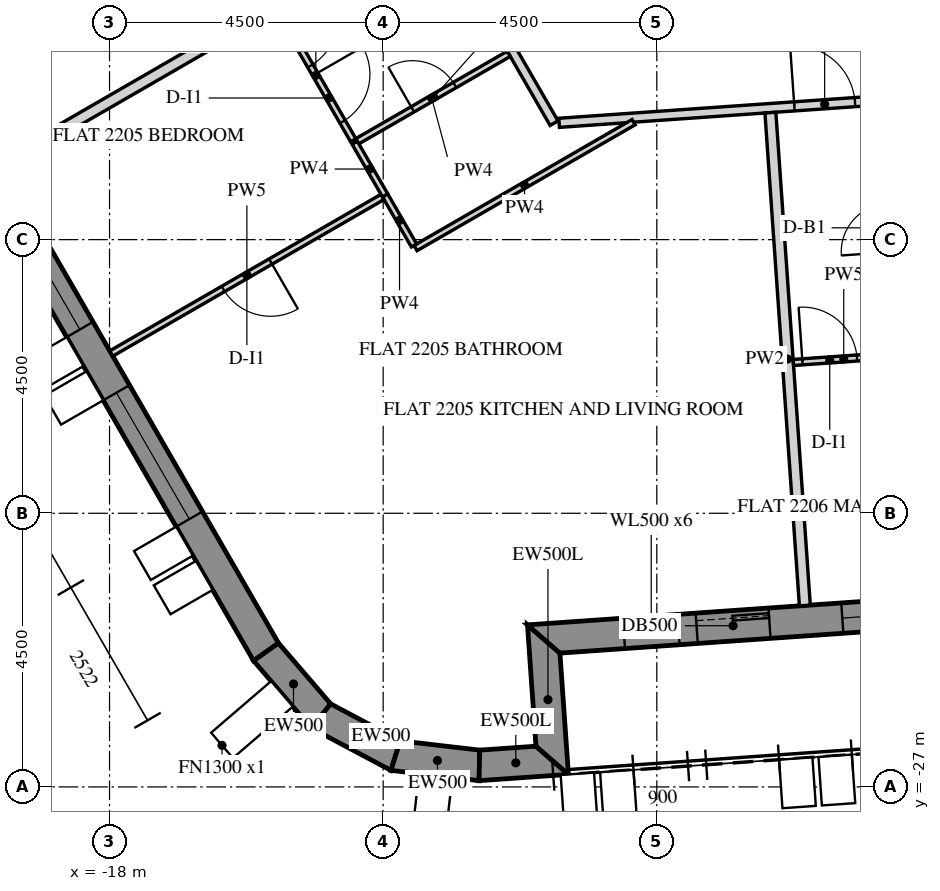
"""IFC4 building model, lengths in metres.
Left out: names, types, materials, properties, quantities, classifications, styles, units other than length and angle.
Written with IfcOpenShell. Run it as: python <this file> out.ifc"""

import sys

from ifc_helpers import new_model, si_unit, direction, frame, frame_2d, origin, place, context, subcontext, project, spatial, polyline, rectangle, outline, extrude, element, fill, save


model = new_model("IFC4")
c1 = context("Model", 3, precision=1e-05, world=origin(), true_north=direction((0.0, 1.0)))
c2 = subcontext(c1, "Body", "Model", "MODEL_VIEW")
j1 = project(units=[si_unit("LENGTHUNIT", "METRE"), si_unit("PLANEANGLEUNIT", "RADIAN")], contexts=[c1])
p1 = place(None, origin())
s1 = spatial("IfcSite", under=j1, at=p1, CompositionType="ELEMENT")
p2 = place(p1, origin())
s2 = spatial("IfcBuilding", under=s1, at=p2, CompositionType="ELEMENT")
p3 = place(p2, frame((0.0, 0.0, 279.6)))
s3 = spatial("IfcBuildingStorey", under=s2, at=p3, CompositionType="ELEMENT", Elevation=279.6)
p4 = place(p3, frame((-28.149, -2.745, -0.15), z_axis=(0.0, 0.0, 1.0), x_axis=(0.500003737743, -0.866023245787, 0.0)))
e1 = element("IfcWall", 1, at=p4, inside=s3, PredefinedType="SOLIDWALL", context=c2, shape_type="SweptSolid", body=[
    extrude(outline(polyline([(-0.021, -0.25), (25.468, -0.25), (25.421, 0.25), (0.021, 0.25), (-0.021, -0.25)])), origin(), (0.0, 0.0, 1.0), 3.9),
])
p5 = place(p4, frame((2.522, 0.0, 0.75)))
e2 = element("IfcOpeningElement", 2, at=p5, cuts=e1, PredefinedType="OPENING", context=c2, shape_type="SweptSolid", body=[
    extrude(rectangle(XDim=2.4, YDim=2.7, at=frame_2d((1.2, 1.35))), frame((0.0, 0.26, 0.0), z_axis=(0.0, -1.0, 0.0), x_axis=(1.0, 0.0, 0.0)), (0.0, 0.0, 1.0), 0.52),
])
p6 = place(p4, frame((6.122, 0.0, 0.75)))
e3 = element("IfcOpeningElement", 3, at=p6, cuts=e1, PredefinedType="OPENING", context=c2, shape_type="SweptSolid", body=[
    extrude(rectangle(XDim=2.4, YDim=2.7, at=frame_2d((1.2, 1.35))), frame((0.0, 0.26, 0.0), z_axis=(0.0, -1.0, 0.0), x_axis=(1.0, 0.0, 0.0)), (0.0, 0.0, 1.0), 0.52),
])
p7 = place(p4, frame((9.722, 0.0, 0.75)))
e4 = element("IfcOpeningElement", 4, at=p7, cuts=e1, PredefinedType="OPENING", context=c2, shape_type="SweptSolid", body=[
    extrude(rectangle(XDim=2.4, YDim=2.7, at=frame_2d((1.2, 1.35))), frame((0.0, 0.26, 0.0), z_axis=(0.0, -1.0, 0.0), x_axis=(1.0, 0.0, 0.0)), (0.0, 0.0, 1.0), 0.52),
])
p8 = place(p4, frame((13.323, 0.0, 0.75)))
e5 = element("IfcOpeningElement", 5, at=p8, cuts=e1, PredefinedType="OPENING", context=c2, shape_type="SweptSolid", body=[
    extrude(rectangle(XDim=2.4, YDim=2.7, at=frame_2d((1.2, 1.35))), frame((0.0, 0.26, 0.0), z_axis=(0.0, -1.0, 0.0), x_axis=(1.0, 0.0, 0.0)), (0.0, 0.0, 1.0), 0.52),
])
p9 = place(p4, frame((16.922, 0.0, 0.75)))
e6 = element("IfcOpeningElement", 6, at=p9, cuts=e1, PredefinedType="OPENING", context=c2, shape_type="SweptSolid", body=[
    extrude(rectangle(XDim=2.4, YDim=2.7, at=frame_2d((1.2, 1.35))), frame((0.0, 0.26, 0.0), z_axis=(0.0, -1.0, 0.0), x_axis=(1.0, 0.0, 0.0)), (0.0, 0.0, 1.0), 0.52),
])
p10 = place(p4, frame((20.522, 0.0, 0.75)))
e7 = element("IfcOpeningElement", 7, at=p10, cuts=e1, PredefinedType="OPENING", context=c2, shape_type="SweptSolid", body=[
    extrude(rectangle(XDim=2.4, YDim=2.7, at=frame_2d((1.2, 1.35))), frame((0.0, 0.26, 0.0), z_axis=(0.0, -1.0, 0.0), x_axis=(1.0, 0.0, 0.0)), (0.0, 0.0, 1.0), 0.52),
])
p11 = place(p3, frame((-15.427, -24.78, -0.15), z_axis=(0.0, 0.0, 1.0), x_axis=(0.651616566281, -0.758548515619, 0.0)))
e8 = element("IfcWall", 8, at=p11, inside=s3, PredefinedType="SOLIDWALL", context=c2, shape_type="SweptSolid", body=[
    extrude(outline(polyline([(-0.023, -0.25), (1.435, -0.25), (1.341, 0.25), (0.023, 0.25), (-0.023, -0.25)])), origin(), (0.0, 0.0, 1.0), 3.9),
])
p12 = place(p3, frame((-14.522, -25.833, -0.15), z_axis=(0.0, 0.0, 1.0), x_axis=(0.882926676147, -0.469510899286, 0.0)))
e9 = element("IfcWall", 9, at=p12, inside=s3, PredefinedType="SOLIDWALL", context=c2, shape_type="SweptSolid", body=[
    extrude(outline(polyline([(-0.047, -0.25), (1.436, -0.25), (1.341, 0.25), (0.047, 0.25), (-0.047, -0.25)])), origin(), (0.0, 0.0, 1.0), 3.9),
])
p13 = place(p3, frame((-13.296, -26.485, -0.15), z_axis=(0.0, 0.0, 1.0), x_axis=(0.993239161627, -0.116086036245, 0.0)))
e10 = element("IfcWall", 10, at=p13, inside=s3, PredefinedType="SOLIDWALL", context=c2, shape_type="SweptSolid", body=[
    extrude(outline(polyline([(-0.047, -0.25), (1.411, -0.25), (1.365, 0.25), (0.047, 0.25), (-0.047, -0.25)])), origin(), (0.0, 0.0, 1.0), 3.9),
])
p14 = place(p3, frame((-11.917, -26.646, -0.15), z_axis=(0.0, 0.0, 1.0), x_axis=(0.997562933087, 0.069772448216, 0.0)))
e11 = element("IfcWall", 11, at=p14, inside=s3, PredefinedType="SOLIDWALL", context=c2, shape_type="SweptSolid", body=[
    extrude(outline(polyline([(-0.023, -0.25), (1.45, -0.25), (0.95, 0.25), (0.023, 0.25), (-0.023, -0.25)])), origin(), (0.0, 0.0, 1.0), 3.9),
])
p15 = place(p3, frame((-10.72, -26.562, -0.15), z_axis=(0.0, 0.0, 1.0), x_axis=(-0.069824268692, 0.99755930726, 0.0)))
e12 = element("IfcWall", 12, at=p15, inside=s3, PredefinedType="SOLIDWALL", context=c2, shape_type="SweptSolid", body=[
    extrude(outline(polyline([(-0.25, -0.25), (1.75, -0.25), (2.25, 0.25), (0.25, 0.25), (-0.25, -0.25)])), origin(), (0.0, 0.0, 1.0), 3.9),
])
p16 = place(p3, frame((-10.86, -24.567, -0.15), z_axis=(0.0, 0.0, 1.0), x_axis=(0.997564329317, 0.06975248292, 0.0)))
e13 = element("IfcWall", 13, at=p16, inside=s3, PredefinedType="SOLIDWALL", context=c2, shape_type="SweptSolid", body=[
    extrude(outline(polyline([(0.25, -0.25), (22.795, -0.25), (23.295, 0.25), (-0.25, 0.25), (0.25, -0.25)])), origin(), (0.0, 0.0, 1.0), 3.9),
])
p17 = place(p16, frame((1.323, 0.0, 1.05)))
e14 = element("IfcOpeningElement", 14, at=p17, cuts=e13, PredefinedType="OPENING", context=c2, shape_type="SweptSolid", body=[
    extrude(rectangle(XDim=0.9, YDim=1.5, at=frame_2d((0.45, 0.75))), frame((0.0, 0.26, 0.0), z_axis=(0.0, -1.0, 0.0), x_axis=(1.0, 0.0, 0.0)), (0.0, 0.0, 1.0), 0.52),
])
p18 = place(p16, frame((2.522, 0.0, 0.15)))
e15 = element("IfcOpeningElement", 15, at=p18, cuts=e13, PredefinedType="OPENING", context=c2, shape_type="SweptSolid", body=[
    extrude(rectangle(XDim=1.2, YDim=2.4, at=frame_2d((0.6, 1.2))), frame((0.0, 0.26, 0.0), z_axis=(0.0, -1.0, 0.0), x_axis=(1.0, 0.0, 0.0)), (0.0, 0.0, 1.0), 0.52),
])
p19 = place(p16, frame((4.922, 0.0, 1.05)))
e16 = element("IfcOpeningElement", 16, at=p19, cuts=e13, PredefinedType="OPENING", context=c2, shape_type="SweptSolid", body=[
    extrude(rectangle(XDim=0.9, YDim=1.5, at=frame_2d((0.45, 0.75))), frame((0.0, 0.26, 0.0), z_axis=(0.0, -1.0, 0.0), x_axis=(1.0, 0.0, 0.0)), (0.0, 0.0, 1.0), 0.52),
])
p20 = place(p16, frame((6.122, 0.0, 0.15)))
e17 = element("IfcOpeningElement", 17, at=p20, cuts=e13, PredefinedType="OPENING", context=c2, shape_type="SweptSolid", body=[
    extrude(rectangle(XDim=1.2, YDim=2.4, at=frame_2d((0.6, 1.2))), frame((0.0, 0.26, 0.0), z_axis=(0.0, -1.0, 0.0), x_axis=(1.0, 0.0, 0.0)), (0.0, 0.0, 1.0), 0.52),
])
p21 = place(p16, frame((8.522, 0.0, 1.05)))
e18 = element("IfcOpeningElement", 18, at=p21, cuts=e13, PredefinedType="OPENING", context=c2, shape_type="SweptSolid", body=[
    extrude(rectangle(XDim=0.9, YDim=1.5, at=frame_2d((0.45, 0.75))), frame((0.0, 0.26, 0.0), z_axis=(0.0, -1.0, 0.0), x_axis=(1.0, 0.0, 0.0)), (0.0, 0.0, 1.0), 0.52),
])
p22 = place(p16, frame((9.722, 0.0, 0.15)))
e19 = element("IfcOpeningElement", 19, at=p22, cuts=e13, PredefinedType="OPENING", context=c2, shape_type="SweptSolid", body=[
    extrude(rectangle(XDim=1.2, YDim=2.4, at=frame_2d((0.6, 1.2))), frame((0.0, 0.26, 0.0), z_axis=(0.0, -1.0, 0.0), x_axis=(1.0, 0.0, 0.0)), (0.0, 0.0, 1.0), 0.52),
])
p23 = place(p16, frame((12.122, 0.0, 1.05)))
e20 = element("IfcOpeningElement", 20, at=p23, cuts=e13, PredefinedType="OPENING", context=c2, shape_type="SweptSolid", body=[
    extrude(rectangle(XDim=0.9, YDim=1.5, at=frame_2d((0.45, 0.75))), frame((0.0, 0.26, 0.0), z_axis=(0.0, -1.0, 0.0), x_axis=(1.0, 0.0, 0.0)), (0.0, 0.0, 1.0), 0.52),
])
p24 = place(p16, frame((13.323, 0.0, 0.15)))
e21 = element("IfcOpeningElement", 21, at=p24, cuts=e13, PredefinedType="OPENING", context=c2, shape_type="SweptSolid", body=[
    extrude(rectangle(XDim=1.2, YDim=2.4, at=frame_2d((0.6, 1.2))), frame((0.0, 0.26, 0.0), z_axis=(0.0, -1.0, 0.0), x_axis=(1.0, 0.0, 0.0)), (0.0, 0.0, 1.0), 0.52),
])
p25 = place(p16, frame((15.722, 0.0, 1.05)))
e22 = element("IfcOpeningElement", 22, at=p25, cuts=e13, PredefinedType="OPENING", context=c2, shape_type="SweptSolid", body=[
    extrude(rectangle(XDim=0.9, YDim=1.5, at=frame_2d((0.45, 0.75))), frame((0.0, 0.26, 0.0), z_axis=(0.0, -1.0, 0.0), x_axis=(1.0, 0.0, 0.0)), (0.0, 0.0, 1.0), 0.52),
])
p26 = place(p16, frame((16.922, 0.0, 0.15)))
e23 = element("IfcOpeningElement", 23, at=p26, cuts=e13, PredefinedType="OPENING", context=c2, shape_type="SweptSolid", body=[
    extrude(rectangle(XDim=1.2, YDim=2.4, at=frame_2d((0.6, 1.2))), frame((0.0, 0.26, 0.0), z_axis=(0.0, -1.0, 0.0), x_axis=(1.0, 0.0, 0.0)), (0.0, 0.0, 1.0), 0.52),
])
p27 = place(p16, frame((19.323, 0.0, 1.05)))
e24 = element("IfcOpeningElement", 24, at=p27, cuts=e13, PredefinedType="OPENING", context=c2, shape_type="SweptSolid", body=[
    extrude(rectangle(XDim=0.9, YDim=1.5, at=frame_2d((0.45, 0.75))), frame((0.0, 0.26, 0.0), z_axis=(0.0, -1.0, 0.0), x_axis=(1.0, 0.0, 0.0)), (0.0, 0.0, 1.0), 0.52),
])
p28 = place(p16, frame((20.522, 0.0, 0.15)))
e25 = element("IfcOpeningElement", 25, at=p28, cuts=e13, PredefinedType="OPENING", context=c2, shape_type="SweptSolid", body=[
    extrude(rectangle(XDim=1.2, YDim=2.4, at=frame_2d((0.6, 1.2))), frame((0.0, 0.26, 0.0), z_axis=(0.0, -1.0, 0.0), x_axis=(1.0, 0.0, 0.0)), (0.0, 0.0, 1.0), 0.52),
])
p29 = place(p3, frame((-18.338, -2.838, 0.0), z_axis=(0.0, 0.0, 1.0), x_axis=(0.499999693481, -0.866025580753, 0.0)))
e26 = element("IfcWall", 26, at=p29, inside=s3, PredefinedType="PARTITIONING", context=c2, shape_type="SweptSolid", body=[
    extrude(rectangle(XDim=15.296, YDim=0.15, at=frame_2d((7.648, 0.0))), origin(), (0.0, 0.0, 1.0), 2.988),
])
p30 = place(p29, frame((2.325, 0.0, 0.0)))
e27 = element("IfcOpeningElement", 27, at=p30, cuts=e26, PredefinedType="OPENING", context=c2, shape_type="SweptSolid", body=[
    extrude(rectangle(XDim=1.0, YDim=2.1, at=frame_2d((0.5, 1.05))), frame((0.0, 0.085, 0.0), z_axis=(0.0, -1.0, 0.0), x_axis=(1.0, 0.0, 0.0)), (0.0, 0.0, 1.0), 0.17),
])
p31 = place(p29, frame((12.136, 0.0, 0.0)))
e28 = element("IfcOpeningElement", 28, at=p31, cuts=e26, PredefinedType="OPENING", context=c2, shape_type="SweptSolid", body=[
    extrude(rectangle(XDim=1.0, YDim=2.1, at=frame_2d((0.5, 1.05))), frame((0.0, 0.085, 0.0), z_axis=(0.0, -1.0, 0.0), x_axis=(1.0, 0.0, 0.0)), (0.0, 0.0, 1.0), 0.17),
])
p32 = place(p3, frame((-10.606, -16.079, 0.0), z_axis=(0.0, 0.0, 1.0), x_axis=(0.997563356349, 0.069766396426, 0.0)))
e29 = element("IfcWall", 29, at=p32, inside=s3, PredefinedType="PARTITIONING", context=c2, shape_type="SweptSolid", body=[
    extrude(rectangle(XDim=17.273, YDim=0.15, at=frame_2d((8.636, 0.0))), origin(), (0.0, 0.0, 1.0), 2.988),
])
p33 = place(p32, frame((3.877, 0.0, 0.0)))
e30 = element("IfcOpeningElement", 30, at=p33, cuts=e29, PredefinedType="OPENING", context=c2, shape_type="SweptSolid", body=[
    extrude(rectangle(XDim=1.0, YDim=2.1, at=frame_2d((0.5, 1.05))), frame((0.0, 0.085, 0.0), z_axis=(0.0, -1.0, 0.0), x_axis=(1.0, 0.0, 0.0)), (0.0, 0.0, 1.0), 0.17),
])
p34 = place(p3, frame((-19.771, -16.755, 0.0), z_axis=(0.0, 0.0, 1.0), x_axis=(0.866022959057, 0.500004234368, 0.0)))
e31 = element("IfcWall", 31, at=p34, inside=s3, PredefinedType="PARTITIONING", context=c2, shape_type="SweptSolid", body=[
    extrude(rectangle(XDim=8.125, YDim=0.18, at=frame_2d((4.062, 0.0))), origin(), (0.0, 0.0, 1.0), 2.988),
])
p35 = place(p3, frame((-9.382, -16.069, 0.0), z_axis=(0.0, 0.0, 1.0), x_axis=(-0.866028486751, -0.499994660107, 0.0)))
e32 = element("IfcWall", 32, at=p35, inside=s3, PredefinedType="PARTITIONING", context=c2, shape_type="SweptSolid", body=[
    extrude(rectangle(XDim=4.141, YDim=0.1, at=frame_2d((2.07, 0.0))), origin(), (0.0, 0.0, 1.0), 2.988),
])
p36 = place(p3, frame((-12.993, -18.096, 0.0), z_axis=(0.0, 0.0, 1.0), x_axis=(-0.500055416838, 0.865993406494, 0.0)))
e33 = element("IfcWall", 33, at=p36, inside=s3, PredefinedType="PARTITIONING", context=c2, shape_type="SweptSolid", body=[
    extrude(rectangle(XDim=0.952, YDim=0.1, at=frame_2d((0.476, 0.0))), origin(), (0.0, 0.0, 1.0), 2.988),
])
p37 = place(p3, frame((-13.511, -17.298, 0.0), z_axis=(0.0, 0.0, 1.0), x_axis=(-0.866026116456, -0.499998765615, 0.0)))
e34 = element("IfcWall", 34, at=p37, inside=s3, PredefinedType="PARTITIONING", context=c2, shape_type="SweptSolid", body=[
    extrude(rectangle(XDim=5.15, YDim=0.1, at=frame_2d((2.575, 0.0))), origin(), (0.0, 0.0, 1.0), 2.988),
])
p38 = place(p37, frame((2.125, 0.0, 0.0)))
e35 = element("IfcOpeningElement", 35, at=p38, cuts=e34, PredefinedType="OPENING", context=c2, shape_type="SweptSolid", body=[
    extrude(rectangle(XDim=0.9, YDim=2.1, at=frame_2d((0.45, 1.05))), frame((0.0, 0.06, 0.0), z_axis=(0.0, -1.0, 0.0), x_axis=(1.0, 0.0, 0.0)), (0.0, 0.0, 1.0), 0.12),
])
p39 = place(p3, frame((-6.565, -24.017, 0.0), z_axis=(0.0, 0.0, 1.0), x_axis=(-0.069741515951, 0.997565096098, 0.0)))
e36 = element("IfcWall", 36, at=p39, inside=s3, PredefinedType="PARTITIONING", context=c2, shape_type="SweptSolid", body=[
    extrude(rectangle(XDim=8.125, YDim=0.18, at=frame_2d((4.062, 0.0))), origin(), (0.0, 0.0, 1.0), 2.988),
])
p40 = place(p3, frame((-13.968, -16.407, 0.0), z_axis=(0.0, 0.0, 1.0), x_axis=(0.866046596414, 0.499963291492, 0.0)))
e37 = element("IfcWall", 37, at=p40, inside=s3, PredefinedType="PARTITIONING", context=c2, shape_type="SweptSolid", body=[
    extrude(rectangle(XDim=2.925, YDim=0.1, at=frame_2d((1.462, 0.0))), origin(), (0.0, 0.0, 1.0), 2.988),
])
p41 = place(p40, frame((1.1, 0.0, 0.0)))
e38 = element("IfcOpeningElement", 38, at=p41, cuts=e37, PredefinedType="OPENING", context=c2, shape_type="SweptSolid", body=[
    extrude(rectangle(XDim=0.8, YDim=2.1, at=frame_2d((0.4, 1.05))), frame((0.0, 0.06, 0.0), z_axis=(0.0, -1.0, 0.0), x_axis=(1.0, 0.0, 0.0)), (0.0, 0.0, 1.0), 0.12),
])
p42 = place(p3, frame((-15.223, -14.233, 0.0), z_axis=(0.0, 0.0, 1.0), x_axis=(0.500000007376, -0.866025399526, 0.0)))
e39 = element("IfcWall", 39, at=p42, inside=s3, PredefinedType="PARTITIONING", context=c2, shape_type="SweptSolid", body=[
    extrude(rectangle(XDim=2.462, YDim=0.1, at=frame_2d((1.231, 0.0))), origin(), (0.0, 0.0, 1.0), 2.988),
])
p43 = place(p42, frame((0.15, 0.0, 0.0)))
e40 = element("IfcOpeningElement", 40, at=p43, cuts=e39, PredefinedType="OPENING", context=c2, shape_type="SweptSolid", body=[
    extrude(rectangle(XDim=0.9, YDim=2.1, at=frame_2d((0.45, 1.05))), frame((0.0, 0.06, 0.0), z_axis=(0.0, -1.0, 0.0), x_axis=(1.0, 0.0, 0.0)), (0.0, 0.0, 1.0), 0.12),
])
p44 = place(p42, frame((1.21, 0.0, 0.0)))
e41 = element("IfcOpeningElement", 41, at=p44, cuts=e39, PredefinedType="OPENING", context=c2, shape_type="SweptSolid", body=[
    extrude(rectangle(XDim=0.9, YDim=2.1, at=frame_2d((0.45, 1.05))), frame((0.0, 0.06, 0.0), z_axis=(0.0, -1.0, 0.0), x_axis=(1.0, 0.0, 0.0)), (0.0, 0.0, 1.0), 0.12),
])
p45 = place(p3, frame((-13.969, -16.405, 0.0), z_axis=(0.0, 0.0, 1.0), x_axis=(0.499912255713, -0.866076057046, 0.0)))
e42 = element("IfcWall", 42, at=p45, inside=s3, PredefinedType="PARTITIONING", context=c2, shape_type="SweptSolid", body=[
    extrude(rectangle(XDim=1.002, YDim=0.1, at=frame_2d((0.501, 0.0))), origin(), (0.0, 0.0, 1.0), 2.988),
])
p46 = place(p3, frame((-6.755, -20.02, 0.0), z_axis=(0.0, 0.0, 1.0), x_axis=(0.9975627517, 0.069775041534, 0.0)))
e43 = element("IfcWall", 43, at=p46, inside=s3, PredefinedType="PARTITIONING", context=c2, shape_type="SweptSolid", body=[
    extrude(rectangle(XDim=1.662, YDim=0.1, at=frame_2d((0.831, 0.0))), origin(), (0.0, 0.0, 1.0), 2.988),
])
p47 = place(p46, frame((0.15, 0.0, 0.0)))
e44 = element("IfcOpeningElement", 44, at=p47, cuts=e43, PredefinedType="OPENING", context=c2, shape_type="SweptSolid", body=[
    extrude(rectangle(XDim=0.9, YDim=2.1, at=frame_2d((0.45, 1.05))), frame((0.0, 0.06, 0.0), z_axis=(0.0, -1.0, 0.0), x_axis=(1.0, 0.0, 0.0)), (0.0, 0.0, 1.0), 0.12),
])
p48 = place(p9, frame((0.0, 0.18, 0.0)))
e45 = element("IfcWindow", 45, at=p48, inside=s3, PartitioningType="DOUBLE_PANEL_VERTICAL", PredefinedType="WINDOW", context=c2, shape_type="SweptSolid", body=[
    extrude(rectangle(XDim=2.4, YDim=2.7, at=frame_2d((1.2, 1.35))), frame((0.0, 0.03, 0.0), z_axis=(0.0, -1.0, 0.0), x_axis=(1.0, 0.0, 0.0)), (0.0, 0.0, 1.0), 0.06),
])
fill(e6, e45)
p49 = place(p10, frame((0.0, 0.18, 0.0)))
e46 = element("IfcWindow", 46, at=p49, inside=s3, PartitioningType="DOUBLE_PANEL_VERTICAL", PredefinedType="WINDOW", context=c2, shape_type="SweptSolid", body=[
    extrude(rectangle(XDim=2.4, YDim=2.7, at=frame_2d((1.2, 1.35))), frame((0.0, 0.03, 0.0), z_axis=(0.0, -1.0, 0.0), x_axis=(1.0, 0.0, 0.0)), (0.0, 0.0, 1.0), 0.06),
])
fill(e7, e46)
p50 = place(p17, frame((0.0, 0.18, 0.0)))
e47 = element("IfcWindow", 47, at=p50, inside=s3, PartitioningType="SINGLE_PANEL", PredefinedType="WINDOW", context=c2, shape_type="SweptSolid", body=[
    extrude(rectangle(XDim=0.9, YDim=1.5, at=frame_2d((0.45, 0.75))), frame((0.0, 0.03, 0.0), z_axis=(0.0, -1.0, 0.0), x_axis=(1.0, 0.0, 0.0)), (0.0, 0.0, 1.0), 0.06),
])
fill(e14, e47)
p51 = place(p18, frame((0.0, 0.175, 0.0)))
e48 = element("IfcDoor", 48, at=p51, inside=s3, OperationType="SLIDING_TO_LEFT", PredefinedType="DOOR", context=c2, shape_type="SweptSolid", body=[
    extrude(rectangle(XDim=1.2, YDim=2.4, at=frame_2d((0.6, 1.2))), frame((0.0, 0.025, 0.0), z_axis=(0.0, -1.0, 0.0), x_axis=(1.0, 0.0, 0.0)), (0.0, 0.0, 1.0), 0.05),
])
fill(e15, e48)
p52 = place(p19, frame((0.0, 0.18, 0.0)))
e49 = element("IfcWindow", 49, at=p52, inside=s3, PartitioningType="SINGLE_PANEL", PredefinedType="WINDOW", context=c2, shape_type="SweptSolid", body=[
    extrude(rectangle(XDim=0.9, YDim=1.5, at=frame_2d((0.45, 0.75))), frame((0.0, 0.03, 0.0), z_axis=(0.0, -1.0, 0.0), x_axis=(1.0, 0.0, 0.0)), (0.0, 0.0, 1.0), 0.06),
])
fill(e16, e49)
p53 = place(p41, origin())
e50 = element("IfcDoor", 50, at=p53, inside=s3, OperationType="SINGLE_SWING_LEFT", PredefinedType="DOOR", context=c2, shape_type="SweptSolid", body=[
    extrude(rectangle(XDim=0.8, YDim=2.1, at=frame_2d((0.4, 1.05))), frame((0.0, 0.025, 0.0), z_axis=(0.0, -1.0, 0.0), x_axis=(1.0, 0.0, 0.0)), (0.0, 0.0, 1.0), 0.05),
])
fill(e38, e50)
p54 = place(p43, origin())
e51 = element("IfcDoor", 51, at=p54, inside=s3, OperationType="SINGLE_SWING_LEFT", PredefinedType="DOOR", context=c2, shape_type="SweptSolid", body=[
    extrude(rectangle(XDim=0.9, YDim=2.1, at=frame_2d((0.45, 1.05))), frame((0.0, 0.025, 0.0), z_axis=(0.0, -1.0, 0.0), x_axis=(1.0, 0.0, 0.0)), (0.0, 0.0, 1.0), 0.05),
])
fill(e40, e51)
p55 = place(p44, origin())
e52 = element("IfcDoor", 52, at=p55, inside=s3, OperationType="SINGLE_SWING_LEFT", PredefinedType="DOOR", context=c2, shape_type="SweptSolid", body=[
    extrude(rectangle(XDim=0.9, YDim=2.1, at=frame_2d((0.45, 1.05))), frame((0.0, 0.025, 0.0), z_axis=(0.0, -1.0, 0.0), x_axis=(1.0, 0.0, 0.0)), (0.0, 0.0, 1.0), 0.05),
])
fill(e41, e52)
p56 = place(p33, origin())
e53 = element("IfcDoor", 53, at=p56, inside=s3, OperationType="SINGLE_SWING_LEFT", PredefinedType="DOOR", context=c2, shape_type="SweptSolid", body=[
    extrude(rectangle(XDim=1.0, YDim=2.1, at=frame_2d((0.5, 1.05))), frame((0.0, 0.025, 0.0), z_axis=(0.0, -1.0, 0.0), x_axis=(1.0, 0.0, 0.0)), (0.0, 0.0, 1.0), 0.05),
])
fill(e30, e53)
p57 = place(p47, origin())
e54 = element("IfcDoor", 54, at=p57, inside=s3, OperationType="SINGLE_SWING_LEFT", PredefinedType="DOOR", context=c2, shape_type="SweptSolid", body=[
    extrude(rectangle(XDim=0.9, YDim=2.1, at=frame_2d((0.45, 1.05))), frame((0.0, 0.025, 0.0), z_axis=(0.0, -1.0, 0.0), x_axis=(1.0, 0.0, 0.0)), (0.0, 0.0, 1.0), 0.05),
])
fill(e44, e54)
p58 = place(p38, origin())
e55 = element("IfcDoor", 55, at=p58, inside=s3, OperationType="SINGLE_SWING_RIGHT", PredefinedType="DOOR", context=c2, shape_type="SweptSolid", body=[
    extrude(rectangle(XDim=0.9, YDim=2.1, at=frame_2d((0.45, 1.05))), frame((0.0, 0.025, 0.0), z_axis=(0.0, -1.0, 0.0), x_axis=(1.0, 0.0, 0.0)), (0.0, 0.0, 1.0), 0.05),
])
fill(e35, e55)
save(model, sys.argv[1])
